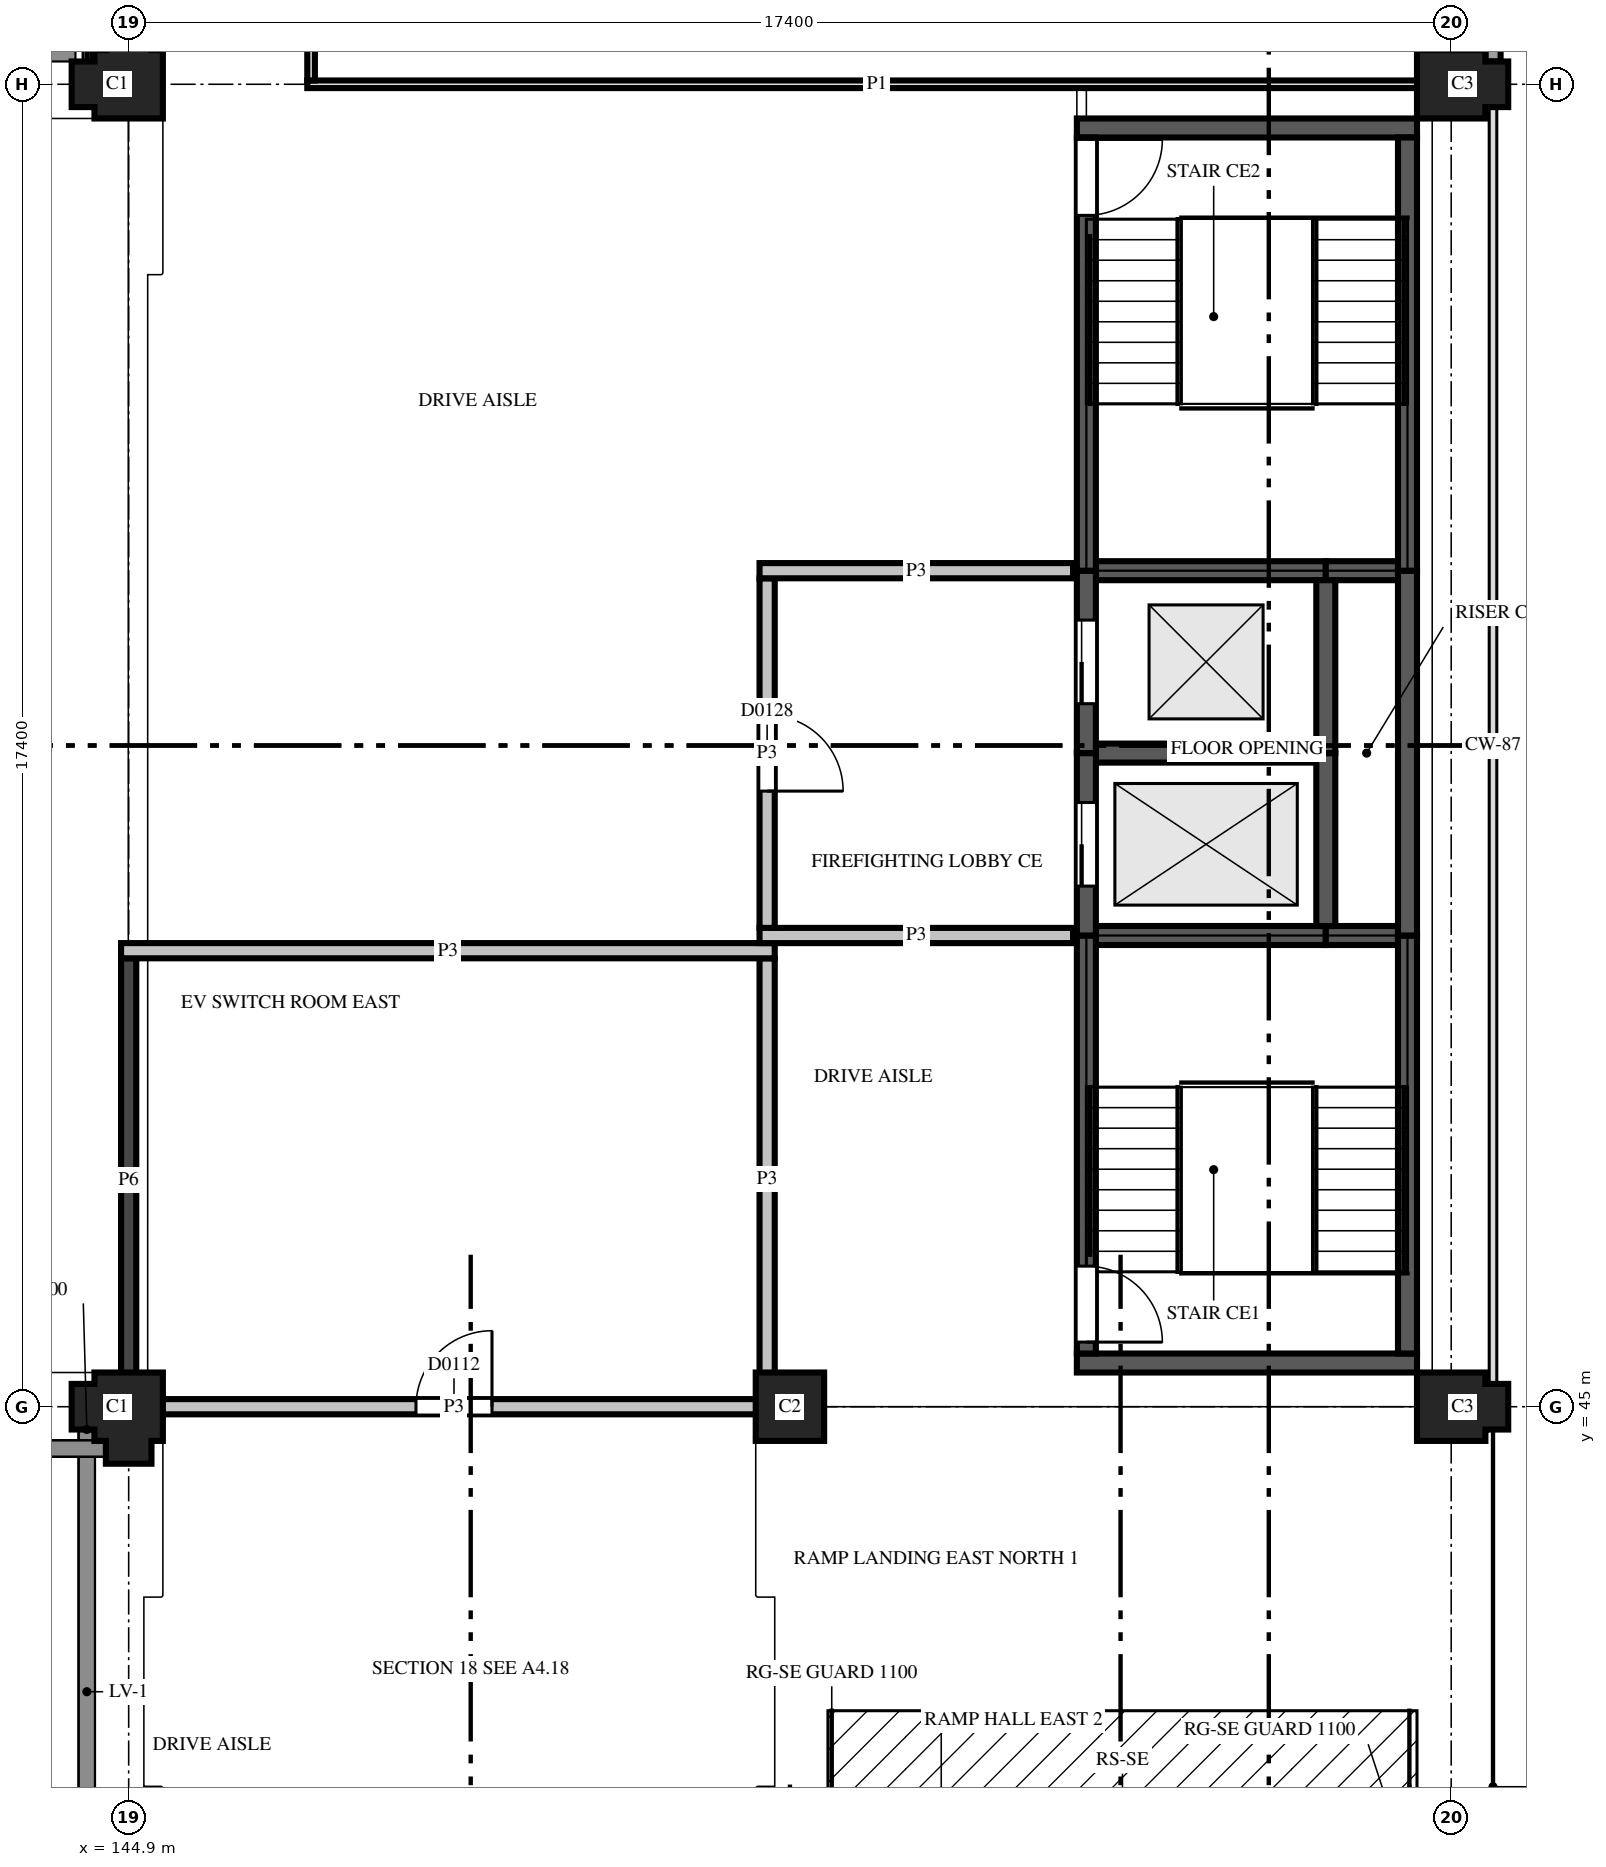
"""IFC4 building model, lengths in metres.
Left out: names, types, materials, properties, quantities, classifications, styles, units other than length and angle.
Written with IfcOpenShell. Run it as: python <this file> out.ifc"""

import sys

from ifc_helpers import new_model, si_unit, direction, frame, frame_2d, origin, place, context, subcontext, project, spatial, polyline, rectangle, outline, extrude, element, fill, save


model = new_model("IFC4")
c1 = context("Model", 3, precision=1e-05, world=origin(), true_north=direction((0.0, 1.0)))
c2 = subcontext(c1, "Body", "Model", "MODEL_VIEW")
j1 = project(units=[si_unit("LENGTHUNIT", "METRE"), si_unit("PLANEANGLEUNIT", "RADIAN")], contexts=[c1])
p1 = place(None, origin())
s1 = spatial("IfcSite", under=j1, at=p1, CompositionType="ELEMENT")
p2 = place(p1, origin())
s2 = spatial("IfcBuilding", under=s1, at=p2, CompositionType="ELEMENT")
p3 = place(p2, frame((0.0, 0.0, 4.5)))
s3 = spatial("IfcBuildingStorey", under=s2, at=p3, CompositionType="ELEMENT", Elevation=4.5)
p4 = place(p3, frame((144.9, 45.0, 0.0), z_axis=(0.0, 0.0, 1.0), x_axis=(-1.0, 0.0, 0.0)))
e1 = element("IfcColumn", 1, at=p4, inside=s3, PredefinedType="COLUMN", context=c2, shape_type="SweptSolid", body=[
    extrude(outline(polyline([(-0.45, -0.45), (0.45, -0.45), (0.45, -0.3), (0.75, -0.3), (0.75, 0.3), (0.45, 0.3), (0.45, 0.45), (0.3, 0.45), (0.3, 0.75), (-0.3, 0.75), (-0.3, 0.45), (-0.45, 0.45), (-0.45, -0.45)])), origin(), (0.0, 0.0, 1.0), 3.7),
])
p5 = place(p3, frame((153.6, 45.0, 0.0), z_axis=(0.0, 0.0, 1.0), x_axis=(1.0, 0.0, 0.0)))
e2 = element("IfcColumn", 2, at=p5, inside=s3, PredefinedType="COLUMN", context=c2, shape_type="SweptSolid", body=[
    extrude(outline(polyline([(-0.45, -0.45), (0.45, -0.45), (0.45, 0.45), (-0.45, 0.45), (-0.45, -0.45)])), origin(), (0.0, 0.0, 1.0), 3.7),
])
p6 = place(p3, frame((162.3, 45.0, 0.0), z_axis=(0.0, 0.0, 1.0), x_axis=(1.0, 0.0, 0.0)))
e3 = element("IfcColumn", 3, at=p6, inside=s3, PredefinedType="COLUMN", context=c2, shape_type="SweptSolid", body=[
    extrude(outline(polyline([(-0.45, -0.45), (0.45, -0.45), (0.45, -0.3), (0.75, -0.3), (0.75, 0.3), (0.45, 0.3), (0.45, 0.45), (-0.45, 0.45), (-0.45, -0.45)])), origin(), (0.0, 0.0, 1.0), 3.7),
])
p7 = place(p3, frame((144.9, 62.4, 0.0), z_axis=(0.0, 0.0, 1.0), x_axis=(0.0, 1.0, 0.0)))
e4 = element("IfcColumn", 4, at=p7, inside=s3, PredefinedType="COLUMN", context=c2, shape_type="SweptSolid", body=[
    extrude(outline(polyline([(-0.45, -0.45), (0.45, -0.45), (0.45, -0.3), (0.75, -0.3), (0.75, 0.3), (0.45, 0.3), (0.45, 0.45), (0.3, 0.45), (0.3, 0.75), (-0.3, 0.75), (-0.3, 0.45), (-0.45, 0.45), (-0.45, -0.45)])), origin(), (0.0, 0.0, 1.0), 3.7),
])
p8 = place(p3, frame((162.3, 62.4, 0.0), z_axis=(0.0, 0.0, 1.0), x_axis=(1.0, 0.0, 0.0)))
e5 = element("IfcColumn", 5, at=p8, inside=s3, PredefinedType="COLUMN", context=c2, shape_type="SweptSolid", body=[
    extrude(outline(polyline([(-0.45, -0.45), (0.45, -0.45), (0.45, -0.3), (0.75, -0.3), (0.75, 0.3), (0.45, 0.3), (0.45, 0.45), (-0.45, 0.45), (-0.45, -0.45)])), origin(), (0.0, 0.0, 1.0), 3.7),
])
p9 = place(p3, frame((157.375, 45.575, 0.0), z_axis=(0.0, 0.0, 1.0), x_axis=(1.0, 0.0, 0.0)))
e6 = element("IfcWall", 6, at=p9, inside=s3, PredefinedType="SHEAR", context=c2, shape_type="SweptSolid", body=[
    extrude(rectangle(XDim=4.475, YDim=0.25, at=frame_2d((2.238, 0.0))), origin(), (0.0, 0.0, 1.0), 3.7),
])
p10 = place(p3, frame((157.625, 51.2, 0.0), z_axis=(0.0, 0.0, 1.0), x_axis=(1.0, 0.0, 0.0)))
e7 = element("IfcWall", 7, at=p10, inside=s3, PredefinedType="SHEAR", context=c2, shape_type="SweptSolid", body=[
    extrude(rectangle(XDim=3.025, YDim=0.25, at=frame_2d((1.512, 0.0))), origin(), (0.0, 0.0, 1.0), 3.7),
])
p11 = place(p3, frame((160.65, 51.2, 0.0), z_axis=(0.0, 0.0, 1.0), x_axis=(1.0, 0.0, 0.0)))
e8 = element("IfcWall", 8, at=p11, inside=s3, PredefinedType="SHEAR", context=c2, shape_type="SweptSolid", body=[
    extrude(rectangle(XDim=0.95, YDim=0.25, at=frame_2d((0.475, 0.0))), origin(), (0.0, 0.0, 1.0), 3.7),
])
p12 = place(p3, frame((157.625, 53.6, 0.0), z_axis=(0.0, 0.0, 1.0), x_axis=(1.0, 0.0, 0.0)))
e9 = element("IfcWall", 9, at=p12, inside=s3, PredefinedType="SHEAR", context=c2, shape_type="SweptSolid", body=[
    extrude(rectangle(XDim=2.9, YDim=0.25, at=frame_2d((1.45, 0.0))), origin(), (0.0, 0.0, 1.0), 3.7),
])
p13 = place(p3, frame((157.625, 56.0, 0.0), z_axis=(0.0, 0.0, 1.0), x_axis=(1.0, 0.0, 0.0)))
e10 = element("IfcWall", 10, at=p13, inside=s3, PredefinedType="SHEAR", context=c2, shape_type="SweptSolid", body=[
    extrude(rectangle(XDim=3.025, YDim=0.25, at=frame_2d((1.512, 0.0))), origin(), (0.0, 0.0, 1.0), 3.7),
])
p14 = place(p3, frame((160.65, 56.0, 0.0), z_axis=(0.0, 0.0, 1.0), x_axis=(1.0, 0.0, 0.0)))
e11 = element("IfcWall", 11, at=p14, inside=s3, PredefinedType="SHEAR", context=c2, shape_type="SweptSolid", body=[
    extrude(rectangle(XDim=0.95, YDim=0.25, at=frame_2d((0.475, 0.0))), origin(), (0.0, 0.0, 1.0), 3.7),
])
p15 = place(p3, frame((157.375, 61.825, 0.0), z_axis=(0.0, 0.0, 1.0), x_axis=(1.0, 0.0, 0.0)))
e12 = element("IfcWall", 12, at=p15, inside=s3, PredefinedType="SHEAR", context=c2, shape_type="SweptSolid", body=[
    extrude(rectangle(XDim=4.475, YDim=0.25, at=frame_2d((2.238, 0.0))), origin(), (0.0, 0.0, 1.0), 3.7),
])
p16 = place(p3, frame((157.5, 45.7, 0.0), z_axis=(0.0, 0.0, 1.0), x_axis=(0.0, 1.0, 0.0)))
e13 = element("IfcWall", 13, at=p16, inside=s3, PredefinedType="SHEAR", context=c2, shape_type="SweptSolid", body=[
    extrude(rectangle(XDim=5.5, YDim=0.25, at=frame_2d((2.75, 0.0))), origin(), (0.0, 0.0, 1.0), 3.7),
])
p17 = place(p16, frame((0.15, 0.0, 0.0)))
e14 = element("IfcOpeningElement", 14, at=p17, cuts=e13, PredefinedType="OPENING", context=c2, shape_type="SweptSolid", body=[
    extrude(rectangle(XDim=1.0, YDim=2.1, at=frame_2d((0.5, 1.05))), frame((0.0, 0.135, 0.0), z_axis=(0.0, -1.0, 0.0), x_axis=(1.0, 0.0, 0.0)), (0.0, 0.0, 1.0), 0.27),
])
p18 = place(p3, frame((157.5, 51.2, 0.0), z_axis=(0.0, 0.0, 1.0), x_axis=(0.0, 1.0, 0.0)))
e15 = element("IfcWall", 15, at=p18, inside=s3, PredefinedType="SHEAR", context=c2, shape_type="SweptSolid", body=[
    extrude(rectangle(XDim=2.4, YDim=0.25, at=frame_2d((1.2, 0.0))), origin(), (0.0, 0.0, 1.0), 3.7),
])
p19 = place(p18, frame((0.65, 0.0, 0.0)))
e16 = element("IfcOpeningElement", 16, at=p19, cuts=e15, PredefinedType="OPENING", context=c2, shape_type="SweptSolid", body=[
    extrude(rectangle(XDim=1.1, YDim=2.1, at=frame_2d((0.55, 1.05))), frame((0.0, 0.135, 0.0), z_axis=(0.0, -1.0, 0.0), x_axis=(1.0, 0.0, 0.0)), (0.0, 0.0, 1.0), 0.27),
])
p20 = place(p3, frame((157.5, 53.6, 0.0), z_axis=(0.0, 0.0, 1.0), x_axis=(0.0, 1.0, 0.0)))
e17 = element("IfcWall", 17, at=p20, inside=s3, PredefinedType="SHEAR", context=c2, shape_type="SweptSolid", body=[
    extrude(rectangle(XDim=2.4, YDim=0.25, at=frame_2d((1.2, 0.0))), origin(), (0.0, 0.0, 1.0), 3.7),
])
p21 = place(p20, frame((0.65, 0.0, 0.0)))
e18 = element("IfcOpeningElement", 18, at=p21, cuts=e17, PredefinedType="OPENING", context=c2, shape_type="SweptSolid", body=[
    extrude(rectangle(XDim=1.1, YDim=2.1, at=frame_2d((0.55, 1.05))), frame((0.0, 0.135, 0.0), z_axis=(0.0, -1.0, 0.0), x_axis=(1.0, 0.0, 0.0)), (0.0, 0.0, 1.0), 0.27),
])
p22 = place(p3, frame((157.5, 56.0, 0.0), z_axis=(0.0, 0.0, 1.0), x_axis=(0.0, 1.0, 0.0)))
e19 = element("IfcWall", 19, at=p22, inside=s3, PredefinedType="SHEAR", context=c2, shape_type="SweptSolid", body=[
    extrude(rectangle(XDim=5.7, YDim=0.25, at=frame_2d((2.85, 0.0))), origin(), (0.0, 0.0, 1.0), 3.7),
])
p23 = place(p22, frame((4.675, 0.0, 0.0)))
e20 = element("IfcOpeningElement", 20, at=p23, cuts=e19, PredefinedType="OPENING", context=c2, shape_type="SweptSolid", body=[
    extrude(rectangle(XDim=1.0, YDim=2.1, at=frame_2d((0.5, 1.05))), frame((0.0, 0.135, 0.0), z_axis=(0.0, -1.0, 0.0), x_axis=(1.0, 0.0, 0.0)), (0.0, 0.0, 1.0), 0.27),
])
p24 = place(p3, frame((160.65, 51.325, 0.0), z_axis=(0.0, 0.0, 1.0), x_axis=(0.0, 1.0, 0.0)))
e21 = element("IfcWall", 21, at=p24, inside=s3, PredefinedType="SHEAR", context=c2, shape_type="SweptSolid", body=[
    extrude(rectangle(XDim=2.275, YDim=0.25, at=frame_2d((1.138, 0.0))), origin(), (0.0, 0.0, 1.0), 3.7),
])
p25 = place(p3, frame((160.65, 53.6, 0.0), z_axis=(0.0, 0.0, 1.0), x_axis=(0.0, 1.0, 0.0)))
e22 = element("IfcWall", 22, at=p25, inside=s3, PredefinedType="SHEAR", context=c2, shape_type="SweptSolid", body=[
    extrude(rectangle(XDim=2.275, YDim=0.25, at=frame_2d((1.137, 0.0))), origin(), (0.0, 0.0, 1.0), 3.7),
])
p26 = place(p3, frame((161.725, 45.7, 0.0), z_axis=(0.0, 0.0, 1.0), x_axis=(0.0, 1.0, 0.0)))
e23 = element("IfcWall", 23, at=p26, inside=s3, PredefinedType="SHEAR", context=c2, shape_type="SweptSolid", body=[
    extrude(rectangle(XDim=5.5, YDim=0.25, at=frame_2d((2.75, 0.0))), origin(), (0.0, 0.0, 1.0), 3.7),
])
p27 = place(p3, frame((161.725, 51.2, 0.0), z_axis=(0.0, 0.0, 1.0), x_axis=(0.0, 1.0, 0.0)))
e24 = element("IfcWall", 24, at=p27, inside=s3, PredefinedType="SHEAR", context=c2, shape_type="SweptSolid", body=[
    extrude(rectangle(XDim=4.8, YDim=0.25, at=frame_2d((2.4, 0.0))), origin(), (0.0, 0.0, 1.0), 3.7),
])
p28 = place(p3, frame((161.725, 56.0, 0.0), z_axis=(0.0, 0.0, 1.0), x_axis=(0.0, 1.0, 0.0)))
e25 = element("IfcWall", 25, at=p28, inside=s3, PredefinedType="SHEAR", context=c2, shape_type="SweptSolid", body=[
    extrude(rectangle(XDim=5.7, YDim=0.25, at=frame_2d((2.85, 0.0))), origin(), (0.0, 0.0, 1.0), 3.7),
])
p29 = place(p3, frame((162.85, 62.7, 0.0), z_axis=(0.0, 0.0, 1.0), x_axis=(0.0, 1.0, 0.0)))
e26 = element("IfcWall", 26, at=p29, inside=s3, PredefinedType="SOLIDWALL", context=c2, shape_type="SweptSolid", body=[
    extrude(rectangle(XDim=6.9, YDim=0.2, at=frame_2d((3.45, 0.0))), origin(), (0.0, 0.0, 1.0), 2.3),
])
p30 = place(p29, frame((2.25, 0.0, 0.55)))
e27 = element("IfcOpeningElement", 27, at=p30, cuts=e26, PredefinedType="OPENING", context=c2, shape_type="SweptSolid", body=[
    extrude(rectangle(XDim=2.4, YDim=1.0, at=frame_2d((1.2, 0.5))), frame((0.0, 0.11, 0.0), z_axis=(0.0, -1.0, 0.0), x_axis=(1.0, 0.0, 0.0)), (0.0, 0.0, 1.0), 0.22),
])
p31 = place(p3, frame((144.96, 45.0, 0.0), z_axis=(0.0, 0.0, 1.0), x_axis=(1.0, 0.0, 0.0)))
e28 = element("IfcWall", 28, at=p31, inside=s3, PredefinedType="PARTITIONING", context=c2, shape_type="SweptSolid", body=[
    extrude(rectangle(XDim=8.44, YDim=0.2, at=frame_2d((4.22, 0.0))), origin(), (0.0, 0.0, 1.0), 2.88),
])
p32 = place(p31, frame((3.72, 0.0, 0.0)))
e29 = element("IfcOpeningElement", 29, at=p32, cuts=e28, PredefinedType="OPENING", context=c2, shape_type="SweptSolid", body=[
    extrude(rectangle(XDim=1.0, YDim=2.1, at=frame_2d((0.5, 1.05))), frame((0.0, 0.11, 0.0), z_axis=(0.0, -1.0, 0.0), x_axis=(1.0, 0.0, 0.0)), (0.0, 0.0, 1.0), 0.22),
])
p33 = place(p3, frame((153.3, 45.1, 0.0), z_axis=(0.0, 0.0, 1.0), x_axis=(0.0, 1.0, 0.0)))
e30 = element("IfcWall", 30, at=p33, inside=s3, PredefinedType="PARTITIONING", context=c2, shape_type="SweptSolid", body=[
    extrude(rectangle(XDim=5.8, YDim=0.2, at=frame_2d((2.9, 0.0))), origin(), (0.0, 0.0, 1.0), 2.88),
])
p34 = place(p3, frame((144.9, 50.9, 0.0), z_axis=(0.0, 0.0, 1.0), x_axis=(0.0, -1.0, 0.0)))
e31 = element("IfcWall", 31, at=p34, inside=s3, PredefinedType="PARTITIONING", context=c2, shape_type="SweptSolid", body=[
    extrude(rectangle(XDim=5.84, YDim=0.2, at=frame_2d((2.92, 0.0))), origin(), (0.0, 0.0, 1.0), 2.2),
])
p35 = place(p3, frame((153.4, 51.0, 0.0), z_axis=(0.0, 0.0, 1.0), x_axis=(-1.0, 0.0, 0.0)))
e32 = element("IfcWall", 32, at=p35, inside=s3, PredefinedType="PARTITIONING", context=c2, shape_type="SweptSolid", body=[
    extrude(rectangle(XDim=8.6, YDim=0.2, at=frame_2d((4.3, 0.0))), origin(), (0.0, 0.0, 1.0), 2.88),
])
p36 = place(p3, frame((153.2, 51.2, 0.0), z_axis=(0.0, 0.0, 1.0), x_axis=(1.0, 0.0, 0.0)))
e33 = element("IfcWall", 33, at=p36, inside=s3, PredefinedType="PARTITIONING", context=c2, shape_type="SweptSolid", body=[
    extrude(rectangle(XDim=4.125, YDim=0.2, at=frame_2d((2.062, 0.0))), origin(), (0.0, 0.0, 1.0), 2.88),
])
p37 = place(p3, frame((153.3, 55.9, 0.0), z_axis=(0.0, 0.0, 1.0), x_axis=(0.0, -1.0, 0.0)))
e34 = element("IfcWall", 34, at=p37, inside=s3, PredefinedType="PARTITIONING", context=c2, shape_type="SweptSolid", body=[
    extrude(rectangle(XDim=4.6, YDim=0.2, at=frame_2d((2.3, 0.0))), origin(), (0.0, 0.0, 1.0), 2.88),
])
p38 = place(p37, frame((1.8, 0.0, 0.0)))
e35 = element("IfcOpeningElement", 35, at=p38, cuts=e34, PredefinedType="OPENING", context=c2, shape_type="SweptSolid", body=[
    extrude(rectangle(XDim=1.0, YDim=2.1, at=frame_2d((0.5, 1.05))), frame((0.0, 0.11, 0.0), z_axis=(0.0, -1.0, 0.0), x_axis=(1.0, 0.0, 0.0)), (0.0, 0.0, 1.0), 0.22),
])
p39 = place(p3, frame((157.325, 56.0, 0.0), z_axis=(0.0, 0.0, 1.0), x_axis=(-1.0, 0.0, 0.0)))
e36 = element("IfcWall", 36, at=p39, inside=s3, PredefinedType="PARTITIONING", context=c2, shape_type="SweptSolid", body=[
    extrude(rectangle(XDim=4.125, YDim=0.2, at=frame_2d((2.062, 0.0))), origin(), (0.0, 0.0, 1.0), 2.88),
])
p40 = place(p3, frame((147.25, 62.4, 0.0), z_axis=(0.0, 0.0, 1.0), x_axis=(1.0, 0.0, 0.0)))
e37 = element("IfcWall", 37, at=p40, inside=s3, PredefinedType="PARTITIONING", context=c2, shape_type="SweptSolid", body=[
    extrude(rectangle(XDim=14.99, YDim=0.1, at=frame_2d((7.495, 0.0))), origin(), (0.0, 0.0, 1.0), 2.88),
])
p41 = place(p3, frame((147.3, 77.35, 0.0), z_axis=(0.0, 0.0, 1.0), x_axis=(0.0, -1.0, 0.0)))
e38 = element("IfcWall", 38, at=p41, inside=s3, PredefinedType="PARTITIONING", context=c2, shape_type="SweptSolid", body=[
    extrude(rectangle(XDim=14.9, YDim=0.1, at=frame_2d((7.45, 0.0))), origin(), (0.0, 0.0, 1.0), 2.88),
])
p42 = place(p41, frame((7.0, 0.0, 0.0)))
e39 = element("IfcOpeningElement", 39, at=p42, cuts=e38, PredefinedType="OPENING", context=c2, shape_type="SweptSolid", body=[
    extrude(rectangle(XDim=0.9, YDim=2.1, at=frame_2d((0.45, 1.05))), frame((0.0, 0.06, 0.0), z_axis=(0.0, -1.0, 0.0), x_axis=(1.0, 0.0, 0.0)), (0.0, 0.0, 1.0), 0.12),
])
p43 = place(p32, origin())
e40 = element("IfcDoor", 40, at=p43, inside=s3, OperationType="SINGLE_SWING_LEFT", PredefinedType="DOOR", context=c2, shape_type="SweptSolid", body=[
    extrude(rectangle(XDim=1.0, YDim=2.1, at=frame_2d((0.5, 1.05))), frame((0.0, 0.025, 0.0), z_axis=(0.0, -1.0, 0.0), x_axis=(1.0, 0.0, 0.0)), (0.0, 0.0, 1.0), 0.05),
])
fill(e29, e40)
p44 = place(p38, origin())
e41 = element("IfcDoor", 41, at=p44, inside=s3, OperationType="SINGLE_SWING_LEFT", PredefinedType="DOOR", context=c2, shape_type="SweptSolid", body=[
    extrude(rectangle(XDim=1.0, YDim=2.1, at=frame_2d((0.5, 1.05))), frame((0.0, 0.025, 0.0), z_axis=(0.0, -1.0, 0.0), x_axis=(1.0, 0.0, 0.0)), (0.0, 0.0, 1.0), 0.05),
])
fill(e35, e41)
p45 = place(p19, origin())
e42 = element("IfcDoor", 42, at=p45, inside=s3, OperationType="SLIDING_TO_LEFT", PredefinedType="DOOR", context=c2, shape_type="SweptSolid", body=[
    extrude(rectangle(XDim=1.1, YDim=2.1, at=frame_2d((0.55, 1.05))), frame((0.0, 0.025, 0.0), z_axis=(0.0, -1.0, 0.0), x_axis=(1.0, 0.0, 0.0)), (0.0, 0.0, 1.0), 0.05),
])
fill(e16, e42)
p46 = place(p21, origin())
e43 = element("IfcDoor", 43, at=p46, inside=s3, OperationType="SLIDING_TO_LEFT", PredefinedType="DOOR", context=c2, shape_type="SweptSolid", body=[
    extrude(rectangle(XDim=1.1, YDim=2.1, at=frame_2d((0.55, 1.05))), frame((0.0, 0.025, 0.0), z_axis=(0.0, -1.0, 0.0), x_axis=(1.0, 0.0, 0.0)), (0.0, 0.0, 1.0), 0.05),
])
fill(e18, e43)
p47 = place(p23, origin())
e44 = element("IfcDoor", 44, at=p47, inside=s3, OperationType="SINGLE_SWING_RIGHT", PredefinedType="DOOR", context=c2, shape_type="SweptSolid", body=[
    extrude(rectangle(XDim=1.0, YDim=2.1, at=frame_2d((0.5, 1.05))), frame((0.0, 0.025, 0.0), z_axis=(0.0, -1.0, 0.0), x_axis=(1.0, 0.0, 0.0)), (0.0, 0.0, 1.0), 0.05),
])
fill(e20, e44)
p48 = place(p17, origin())
e45 = element("IfcDoor", 45, at=p48, inside=s3, OperationType="SINGLE_SWING_LEFT", PredefinedType="DOOR", context=c2, shape_type="SweptSolid", body=[
    extrude(rectangle(XDim=1.0, YDim=2.1, at=frame_2d((0.5, 1.05))), frame((0.0, 0.025, 0.0), z_axis=(0.0, -1.0, 0.0), x_axis=(1.0, 0.0, 0.0)), (0.0, 0.0, 1.0), 0.05),
])
fill(e14, e45)
save(model, sys.argv[1])
